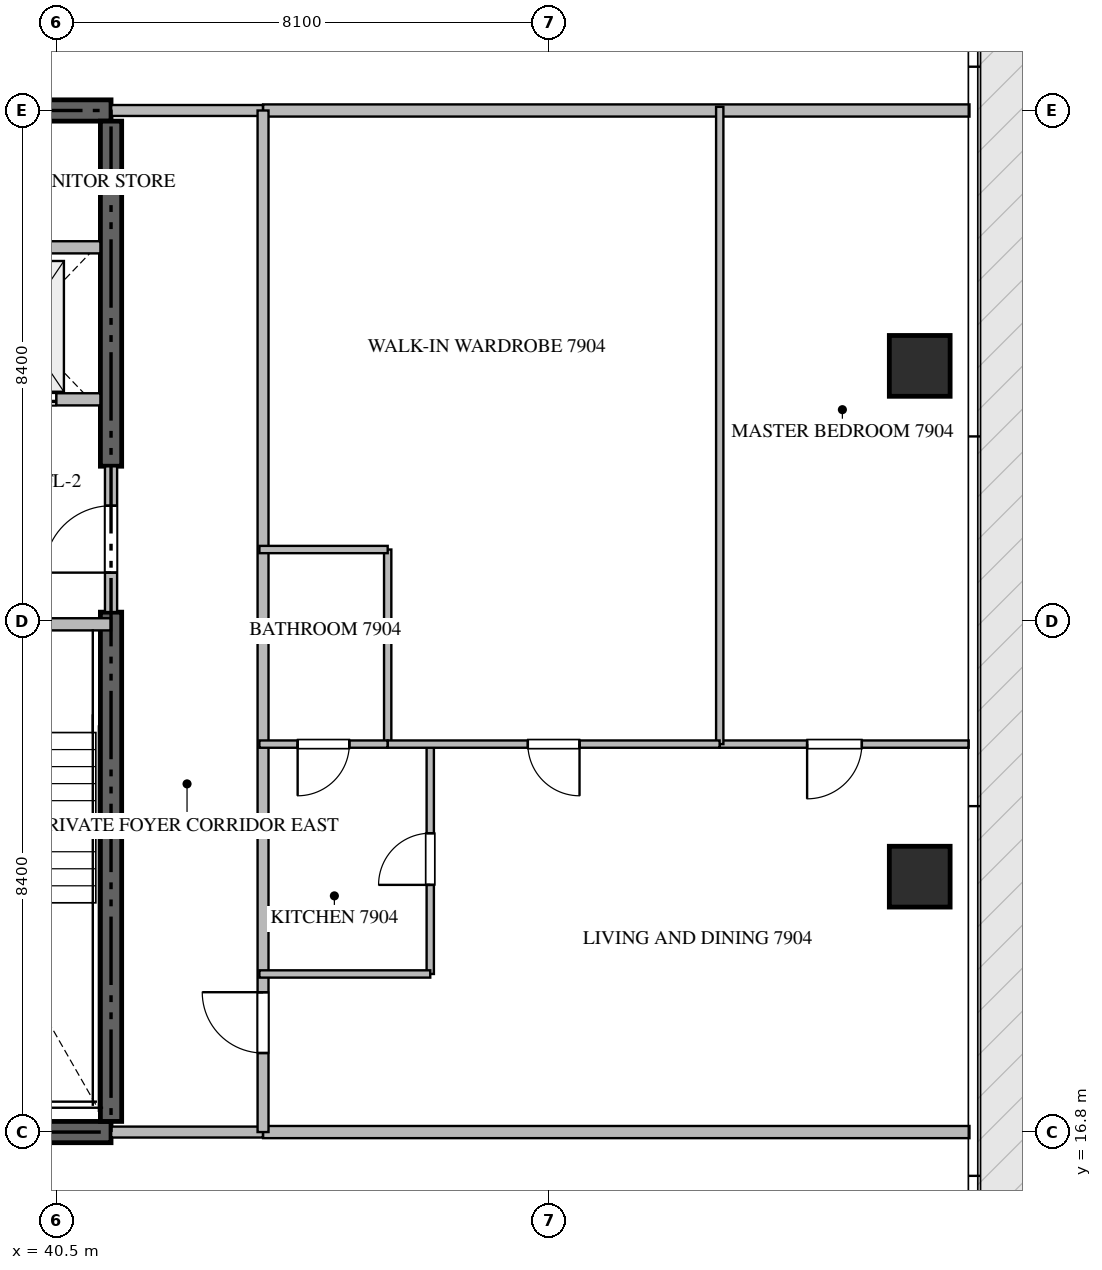
"""IFC4 building model, lengths in metres.
Left out: names, types, materials, properties, quantities, classifications, styles, units other than length and angle.
Written with IfcOpenShell. Run it as: python <this file> out.ifc"""

import sys

from ifc_helpers import new_model, si_unit, direction, frame, frame_2d, origin, origin_2d, place, context, subcontext, project, spatial, rectangle, extrude, source, transform, mapped, element, fill, save


model = new_model("IFC4")
c1 = context("Model", 3, precision=1e-05, world=origin(), true_north=direction((0.0, 1.0)))
c2 = subcontext(c1, "Body", "Model", "MODEL_VIEW")
j1 = project(units=[si_unit("LENGTHUNIT", "METRE"), si_unit("PLANEANGLEUNIT", "RADIAN")], contexts=[c1])
p1 = place(None, origin())
s1 = spatial("IfcSite", under=j1, at=p1, CompositionType="ELEMENT")
p2 = place(p1, origin())
s2 = spatial("IfcBuilding", under=s1, at=p2, CompositionType="ELEMENT")
p3 = place(p2, frame((0.0, 0.0, 317.75)))
s3 = spatial("IfcBuildingStorey", under=s2, at=p3, CompositionType="ELEMENT", Elevation=317.75)
for number, where, z_axis, x_axis in (
    (1, (23.4, 16.8, -0.26), (0.0, 0.0, 1.0), (1.0, 0.0, 0.0)),
    (2, (41.4, 33.6, -0.26), (0.0, 0.0, 1.0), (-1.0, 0.0, 0.0)),
):
    element("IfcWall", number, at=place(p3, frame(where, z_axis=z_axis, x_axis=x_axis)), inside=s3, PredefinedType="SHEAR", context=c2, shape_type="SweptSolid", body=[
        extrude(rectangle(XDim=18.0, YDim=0.35, at=frame_2d((9.0, 0.0))), origin(), (0.0, 0.0, 1.0), 4.048),
    ])
p4 = place(p3, frame((41.4, 16.975, -0.26), z_axis=(0.0, 0.0, 1.0), x_axis=(0.0, 1.0, 0.0)))
e3 = element("IfcWall", 3, at=p4, inside=s3, PredefinedType="SHEAR", context=c2, shape_type="SweptSolid", body=[
    extrude(rectangle(XDim=8.375, YDim=0.35, at=frame_2d((4.188, 0.0))), origin(), (0.0, 0.0, 1.0), 4.048),
])
p5 = place(p3, frame((41.4, 27.75, -0.26), z_axis=(0.0, 0.0, 1.0), x_axis=(0.0, 1.0, 0.0)))
e4 = element("IfcWall", 4, at=p5, inside=s3, PredefinedType="SHEAR", context=c2, shape_type="SweptSolid", body=[
    extrude(rectangle(XDim=5.675, YDim=0.35, at=frame_2d((2.837, 0.0))), origin(), (0.0, 0.0, 1.0), 4.048),
])
m1 = source(origin(), c2, "Body", "SweptSolid", [
    extrude(rectangle(XDim=1.0, YDim=1.0, at=origin_2d()), origin(), (0.0, 0.0, 1.0), 4.05),
])
for number, where, z_axis, x_axis in (
    (5, (54.7, 21.0, -0.26), (0.0, 0.0, 1.0), (1.0, 0.0, 0.0)),
    (6, (54.7, 29.4, -0.26), (0.0, 0.0, 1.0), (1.0, 0.0, 0.0)),
):
    element("IfcColumn", number, at=place(p3, frame(where, z_axis=z_axis, x_axis=x_axis)), inside=s3, PredefinedType="COLUMN", context=c2, shape_type="MappedRepresentation", body=[
        mapped(m1, transform((0.0, 0.0, 0.0), scale=1.0)),
    ])
p6 = place(p3, frame((36.95, 25.15, 0.0), z_axis=(0.0, 0.0, 1.0), x_axis=(1.0, 0.0, 0.0)))
e7 = element("IfcWall", 7, at=p6, inside=s3, PredefinedType="STANDARD", context=c2, shape_type="SweptSolid", body=[
    extrude(rectangle(XDim=4.45, YDim=0.2, at=frame_2d((2.225, 0.0))), origin(), (0.0, 0.0, 1.0), 3.79),
])
p7 = place(p6, frame((1.65, 0.0, 0.0)))
e8 = element("IfcOpeningElement", 8, at=p7, cuts=e7, PredefinedType="OPENING", context=c2, shape_type="SweptSolid", body=[
    extrude(rectangle(XDim=1.1, YDim=2.15, at=frame_2d((0.55, 1.075))), frame((0.0, 0.11, 0.0), z_axis=(0.0, -1.0, 0.0), x_axis=(1.0, 0.0, 0.0)), (0.0, 0.0, 1.0), 0.22),
])
p8 = place(p3, frame((38.75, 28.85, 0.0), z_axis=(0.0, 0.0, 1.0), x_axis=(1.0, 0.0, 0.0)))
e9 = element("IfcWall", 9, at=p8, inside=s3, PredefinedType="STANDARD", context=c2, shape_type="SweptSolid", body=[
    extrude(rectangle(XDim=2.475, YDim=0.2, at=frame_2d((1.238, 0.0))), origin(), (0.0, 0.0, 1.0), 3.79),
])
p9 = place(p8, frame((0.55, 0.0, 0.0)))
e10 = element("IfcOpeningElement", 10, at=p9, cuts=e9, PredefinedType="OPENING", context=c2, shape_type="SweptSolid", body=[
    extrude(rectangle(XDim=1.2, YDim=2.2, at=frame_2d((0.6, 1.1))), frame((0.0, 0.11, 0.0), z_axis=(0.0, -1.0, 0.0), x_axis=(1.0, 0.0, 0.0)), (0.0, 0.0, 1.0), 0.22),
])
p10 = place(p3, frame((38.75, 31.35, 0.0), z_axis=(0.0, 0.0, 1.0), x_axis=(1.0, 0.0, 0.0)))
e11 = element("IfcWall", 11, at=p10, inside=s3, PredefinedType="STANDARD", context=c2, shape_type="SweptSolid", body=[
    extrude(rectangle(XDim=2.475, YDim=0.2, at=frame_2d((1.238, 0.0))), origin(), (0.0, 0.0, 1.0), 3.79),
])
p11 = place(p3, frame((41.4, 25.352, 0.0), z_axis=(0.0, 0.0, 1.0), x_axis=(0.0, 1.0, 0.0)))
e12 = element("IfcWall", 12, at=p11, inside=s3, PredefinedType="STANDARD", context=c2, shape_type="SweptSolid", body=[
    extrude(rectangle(XDim=2.396, YDim=0.2, at=frame_2d((1.198, 0.0))), origin(), (0.0, 0.0, 1.0), 3.79),
])
p12 = place(p11, frame((0.648, 0.0, 0.0)))
e13 = element("IfcOpeningElement", 13, at=p12, cuts=e12, PredefinedType="OPENING", context=c2, shape_type="SweptSolid", body=[
    extrude(rectangle(XDim=1.1, YDim=2.15, at=frame_2d((0.55, 1.075))), frame((0.0, 0.11, 0.0), z_axis=(0.0, -1.0, 0.0), x_axis=(1.0, 0.0, 0.0)), (0.0, 0.0, 1.0), 0.22),
])
for number, where, z_axis, x_axis in (
    (14, (43.9, 16.8, 0.0), (0.0, 0.0, 1.0), (1.0, 0.0, 0.0)),
    (15, (43.9, 33.6, 0.0), (0.0, 0.0, 1.0), (1.0, 0.0, 0.0)),
):
    element("IfcWall", number, at=place(p3, frame(where, z_axis=z_axis, x_axis=x_axis)), inside=s3, PredefinedType="PARTITIONING", context=c2, shape_type="SweptSolid", body=[
        extrude(rectangle(XDim=11.618, YDim=0.2, at=frame_2d((5.809, 0.0))), origin(), (0.0, 0.0, 1.0), 3.79),
    ])
for number, where, z_axis, x_axis in (
    (16, (41.402, 16.8, 0.0), (0.0, 0.0, 1.0), (1.0, 0.0, 0.0)),
    (17, (41.402, 33.6, 0.0), (0.0, 0.0, 1.0), (1.0, 0.0, 0.0)),
):
    element("IfcWall", number, at=place(p3, frame(where, z_axis=z_axis, x_axis=x_axis)), inside=s3, PredefinedType="PARTITIONING", context=c2, shape_type="SweptSolid", body=[
        extrude(rectangle(XDim=2.496, YDim=0.18, at=frame_2d((1.248, 0.0))), origin(), (0.0, 0.0, 1.0), 3.79),
    ])
p13 = place(p3, frame((43.9, 16.8, 0.0), z_axis=(0.0, 0.0, 1.0), x_axis=(0.0, 1.0, 0.0)))
e18 = element("IfcWall", 18, at=p13, inside=s3, PredefinedType="PARTITIONING", context=c2, shape_type="SweptSolid", body=[
    extrude(rectangle(XDim=16.8, YDim=0.18, at=frame_2d((8.4, 0.0))), origin(), (0.0, 0.0, 1.0), 3.79),
])
p14 = place(p13, frame((1.3, 0.0, 0.0)))
e19 = element("IfcOpeningElement", 19, at=p14, cuts=e18, PredefinedType="OPENING", context=c2, shape_type="SweptSolid", body=[
    extrude(rectangle(XDim=1.0, YDim=2.15, at=frame_2d((0.5, 1.075))), frame((0.0, 0.1, 0.0), z_axis=(0.0, -1.0, 0.0), x_axis=(1.0, 0.0, 0.0)), (0.0, 0.0, 1.0), 0.2),
])
p15 = place(p3, frame((46.65, 19.4, 0.0), z_axis=(0.0, 0.0, 1.0), x_axis=(0.0, 1.0, 0.0)))
e20 = element("IfcWall", 20, at=p15, inside=s3, PredefinedType="PARTITIONING", context=c2, shape_type="SweptSolid", body=[
    extrude(rectangle(XDim=3.78, YDim=0.12, at=frame_2d((1.89, 0.0))), origin(), (0.0, 0.0, 1.0), 3.79),
])
p16 = place(p15, frame((1.465, 0.0, 0.0)))
e21 = element("IfcOpeningElement", 21, at=p16, cuts=e20, PredefinedType="OPENING", context=c2, shape_type="SweptSolid", body=[
    extrude(rectangle(XDim=0.85, YDim=2.1, at=frame_2d((0.425, 1.05))), frame((0.0, 0.07, 0.0), z_axis=(0.0, -1.0, 0.0), x_axis=(1.0, 0.0, 0.0)), (0.0, 0.0, 1.0), 0.14),
])
p17 = place(p3, frame((46.65, 19.4, 0.0), z_axis=(0.0, 0.0, 1.0), x_axis=(-1.0, 0.0, 0.0)))
e22 = element("IfcWall", 22, at=p17, inside=s3, PredefinedType="PARTITIONING", context=c2, shape_type="SweptSolid", body=[
    extrude(rectangle(XDim=2.81, YDim=0.12, at=frame_2d((1.405, 0.0))), origin(), (0.0, 0.0, 1.0), 3.79),
])
p18 = place(p3, frame((55.505, 23.18, 0.0), z_axis=(0.0, 0.0, 1.0), x_axis=(-1.0, 0.0, 0.0)))
e23 = element("IfcWall", 23, at=p18, inside=s3, PredefinedType="PARTITIONING", context=c2, shape_type="SweptSolid", body=[
    extrude(rectangle(XDim=4.094, YDim=0.12, at=frame_2d((2.047, 0.0))), origin(), (0.0, 0.0, 1.0), 3.79),
])
p19 = place(p18, frame((1.757, 0.0, 0.0)))
e24 = element("IfcOpeningElement", 24, at=p19, cuts=e23, PredefinedType="OPENING", context=c2, shape_type="SweptSolid", body=[
    extrude(rectangle(XDim=0.9, YDim=2.1, at=frame_2d((0.45, 1.05))), frame((0.0, 0.07, 0.0), z_axis=(0.0, -1.0, 0.0), x_axis=(1.0, 0.0, 0.0)), (0.0, 0.0, 1.0), 0.14),
])
p20 = place(p3, frame((51.411, 23.18, 0.0), z_axis=(0.0, 0.0, 1.0), x_axis=(0.0, 1.0, 0.0)))
e25 = element("IfcWall", 25, at=p20, inside=s3, PredefinedType="PARTITIONING", context=c2, shape_type="SweptSolid", body=[
    extrude(rectangle(XDim=10.48, YDim=0.12, at=frame_2d((5.24, 0.0))), origin(), (0.0, 0.0, 1.0), 3.79),
])
p21 = place(p3, frame((45.95, 23.18, 0.0), z_axis=(0.0, 0.0, 1.0), x_axis=(0.0, 1.0, 0.0)))
e26 = element("IfcWall", 26, at=p21, inside=s3, PredefinedType="PARTITIONING", context=c2, shape_type="SweptSolid", body=[
    extrude(rectangle(XDim=3.2, YDim=0.12, at=frame_2d((1.6, 0.0))), origin(), (0.0, 0.0, 1.0), 3.79),
])
p22 = place(p3, frame((45.95, 26.38, 0.0), z_axis=(0.0, 0.0, 1.0), x_axis=(-1.0, 0.0, 0.0)))
e27 = element("IfcWall", 27, at=p22, inside=s3, PredefinedType="PARTITIONING", context=c2, shape_type="SweptSolid", body=[
    extrude(rectangle(XDim=2.11, YDim=0.12, at=frame_2d((1.055, 0.0))), origin(), (0.0, 0.0, 1.0), 3.79),
])
p23 = place(p3, frame((51.409, 23.18, 0.0), z_axis=(0.0, 0.0, 1.0), x_axis=(-1.0, 0.0, 0.0)))
e28 = element("IfcWall", 28, at=p23, inside=s3, PredefinedType="PARTITIONING", context=c2, shape_type="SweptSolid", body=[
    extrude(rectangle(XDim=5.459, YDim=0.12, at=frame_2d((2.729, 0.0))), origin(), (0.0, 0.0, 1.0), 3.79),
])
p24 = place(p23, frame((2.304, 0.0, 0.0)))
e29 = element("IfcOpeningElement", 29, at=p24, cuts=e28, PredefinedType="OPENING", context=c2, shape_type="SweptSolid", body=[
    extrude(rectangle(XDim=0.85, YDim=2.1, at=frame_2d((0.425, 1.05))), frame((0.0, 0.07, 0.0), z_axis=(0.0, -1.0, 0.0), x_axis=(1.0, 0.0, 0.0)), (0.0, 0.0, 1.0), 0.14),
])
p25 = place(p3, frame((45.948, 23.18, 0.0), z_axis=(0.0, 0.0, 1.0), x_axis=(-1.0, 0.0, 0.0)))
e30 = element("IfcWall", 30, at=p25, inside=s3, PredefinedType="PARTITIONING", context=c2, shape_type="SweptSolid", body=[
    extrude(rectangle(XDim=2.108, YDim=0.12, at=frame_2d((1.054, 0.0))), origin(), (0.0, 0.0, 1.0), 3.79),
])
p26 = place(p25, frame((0.629, 0.0, 0.0)))
e31 = element("IfcOpeningElement", 31, at=p26, cuts=e30, PredefinedType="OPENING", context=c2, shape_type="SweptSolid", body=[
    extrude(rectangle(XDim=0.85, YDim=2.1, at=frame_2d((0.425, 1.05))), frame((0.0, 0.07, 0.0), z_axis=(0.0, -1.0, 0.0), x_axis=(1.0, 0.0, 0.0)), (0.0, 0.0, 1.0), 0.14),
])
m2 = source(origin(), c2, "Body", "SweptSolid", [
    extrude(rectangle(XDim=1.2, YDim=2.2, at=frame_2d((0.6, 1.1))), frame((0.0, 0.025, 0.0), z_axis=(0.0, -1.0, 0.0), x_axis=(1.0, 0.0, 0.0)), (0.0, 0.0, 1.0), 0.05),
])
p27 = place(p9, origin())
e32 = element("IfcDoor", 32, at=p27, inside=s3, OperationType="DOUBLE_DOOR_SLIDING", PredefinedType="DOOR", context=c2, shape_type="MappedRepresentation", body=[
    mapped(m2, transform((0.0, 0.0, 0.0), scale=1.0)),
])
fill(e10, e32)
m3 = source(origin(), c2, "Body", "SweptSolid", [
    extrude(rectangle(XDim=1.1, YDim=2.15, at=frame_2d((0.55, 1.075))), frame((0.0, 0.025, 0.0), z_axis=(0.0, -1.0, 0.0), x_axis=(1.0, 0.0, 0.0)), (0.0, 0.0, 1.0), 0.05),
])
p28 = place(p12, origin())
e33 = element("IfcDoor", 33, at=p28, inside=s3, OperationType="SINGLE_SWING_LEFT", PredefinedType="DOOR", context=c2, shape_type="MappedRepresentation", body=[
    mapped(m3, transform((0.0, 0.0, 0.0), scale=1.0)),
])
fill(e13, e33)
m4 = source(origin(), c2, "Body", "SweptSolid", [
    extrude(rectangle(XDim=1.0, YDim=2.15, at=frame_2d((0.5, 1.075))), frame((0.0, 0.025, 0.0), z_axis=(0.0, -1.0, 0.0), x_axis=(1.0, 0.0, 0.0)), (0.0, 0.0, 1.0), 0.05),
])
p29 = place(p14, origin())
e34 = element("IfcDoor", 34, at=p29, inside=s3, OperationType="SINGLE_SWING_RIGHT", PredefinedType="DOOR", context=c2, shape_type="MappedRepresentation", body=[
    mapped(m4, transform((0.0, 0.0, 0.0), scale=1.0)),
])
fill(e19, e34)
m5 = source(origin(), c2, "Body", "SweptSolid", [
    extrude(rectangle(XDim=0.85, YDim=2.1, at=frame_2d((0.425, 1.05))), frame((0.0, 0.025, 0.0), z_axis=(0.0, -1.0, 0.0), x_axis=(1.0, 0.0, 0.0)), (0.0, 0.0, 1.0), 0.05),
])
p30 = place(p16, origin())
e35 = element("IfcDoor", 35, at=p30, inside=s3, OperationType="SINGLE_SWING_LEFT", PredefinedType="DOOR", context=c2, shape_type="MappedRepresentation", body=[
    mapped(m5, transform((0.0, 0.0, 0.0), scale=1.0)),
])
fill(e21, e35)
m6 = source(origin(), c2, "Body", "SweptSolid", [
    extrude(rectangle(XDim=0.9, YDim=2.1, at=frame_2d((0.45, 1.05))), frame((0.0, 0.025, 0.0), z_axis=(0.0, -1.0, 0.0), x_axis=(1.0, 0.0, 0.0)), (0.0, 0.0, 1.0), 0.05),
])
p31 = place(p19, origin())
e36 = element("IfcDoor", 36, at=p31, inside=s3, OperationType="SINGLE_SWING_RIGHT", PredefinedType="DOOR", context=c2, shape_type="MappedRepresentation", body=[
    mapped(m6, transform((0.0, 0.0, 0.0), scale=1.0)),
])
fill(e24, e36)
p32 = place(p24, origin())
e37 = element("IfcDoor", 37, at=p32, inside=s3, OperationType="SINGLE_SWING_LEFT", PredefinedType="DOOR", context=c2, shape_type="MappedRepresentation", body=[
    mapped(m5, transform((0.0, 0.0, 0.0), scale=1.0)),
])
fill(e29, e37)
p33 = place(p26, origin())
e38 = element("IfcDoor", 38, at=p33, inside=s3, OperationType="SINGLE_SWING_RIGHT", PredefinedType="DOOR", context=c2, shape_type="MappedRepresentation", body=[
    mapped(m5, transform((0.0, 0.0, 0.0), scale=1.0)),
])
fill(e31, e38)
save(model, sys.argv[1])
